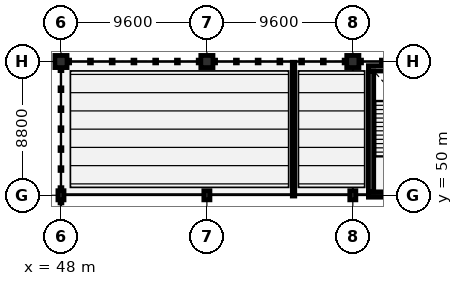
"""IFC4 building model, lengths in metres.
Left out: names, types, materials, properties, quantities, classifications, styles, units other than length and angle.
Written with IfcOpenShell. Run it as: python <this file> out.ifc"""

import sys

from ifc_helpers import new_model, si_unit, direction, frame, frame_2d, origin, origin_2d, place, context, subcontext, project, spatial, rectangle, extrude, element, fill, save


model = new_model("IFC4")
c1 = context("Model", 3, precision=1e-05, world=origin(), true_north=direction((0.0, 1.0)))
c2 = subcontext(c1, "Body", "Model", "MODEL_VIEW")
j1 = project(units=[si_unit("LENGTHUNIT", "METRE"), si_unit("PLANEANGLEUNIT", "RADIAN")], contexts=[c1])
p1 = place(None, origin())
s1 = spatial("IfcSite", under=j1, at=p1, CompositionType="ELEMENT")
p2 = place(p1, origin())
s2 = spatial("IfcBuilding", under=s1, at=p2, CompositionType="ELEMENT")
p3 = place(p2, frame((0.0, 0.0, 4.8)))
s3 = spatial("IfcBuildingStorey", under=s2, at=p3, CompositionType="ELEMENT", Elevation=4.8)
p4 = place(p3, frame((48.0, 50.0, 0.0), z_axis=(0.0, 0.0, 1.0), x_axis=(1.0, 0.0, 0.0)))
e1 = element("IfcColumn", 1, at=p4, inside=s3, PredefinedType="COLUMN", context=c2, shape_type="SweptSolid", body=[
    extrude(rectangle(XDim=0.4, YDim=0.6, at=origin_2d()), origin(), (0.0, 0.0, 1.0), 4.8),
])
p5 = place(p3, frame((48.0, 58.8, 0.0), z_axis=(0.0, 0.0, 1.0), x_axis=(1.0, 0.0, 0.0)))
e2 = element("IfcColumn", 2, at=p5, inside=s3, PredefinedType="COLUMN", context=c2, shape_type="SweptSolid", body=[
    extrude(rectangle(XDim=0.8, YDim=0.8, at=origin_2d()), origin(), (0.0, 0.0, 1.0), 4.8),
])
p6 = place(p3, frame((57.6, 50.0, 0.0), z_axis=(0.0, 0.0, 1.0), x_axis=(1.0, 0.0, 0.0)))
e3 = element("IfcColumn", 3, at=p6, inside=s3, PredefinedType="COLUMN", context=c2, shape_type="SweptSolid", body=[
    extrude(rectangle(XDim=0.4, YDim=0.6, at=origin_2d()), origin(), (0.0, 0.0, 1.0), 4.8),
])
p7 = place(p3, frame((57.6, 58.8, 0.0), z_axis=(0.0, 0.0, 1.0), x_axis=(1.0, 0.0, 0.0)))
e4 = element("IfcColumn", 4, at=p7, inside=s3, PredefinedType="COLUMN", context=c2, shape_type="SweptSolid", body=[
    extrude(rectangle(XDim=0.8, YDim=0.8, at=origin_2d()), origin(), (0.0, 0.0, 1.0), 4.8),
])
p8 = place(p3, frame((67.2, 50.0, 0.0), z_axis=(0.0, 0.0, 1.0), x_axis=(1.0, 0.0, 0.0)))
e5 = element("IfcColumn", 5, at=p8, inside=s3, PredefinedType="COLUMN", context=c2, shape_type="SweptSolid", body=[
    extrude(rectangle(XDim=0.4, YDim=0.6, at=origin_2d()), origin(), (0.0, 0.0, 1.0), 4.8),
])
p9 = place(p3, frame((67.2, 58.8, 0.0), z_axis=(0.0, 0.0, 1.0), x_axis=(1.0, 0.0, 0.0)))
e6 = element("IfcColumn", 6, at=p9, inside=s3, PredefinedType="COLUMN", context=c2, shape_type="SweptSolid", body=[
    extrude(rectangle(XDim=0.8, YDim=0.8, at=origin_2d()), origin(), (0.0, 0.0, 1.0), 4.8),
])
for number, where, z_axis, x_axis in (
    (7, (73.875, 50.05, 0.0), (0.0, 0.0, 1.0), (-1.0, 0.0, 0.0)),
    (8, (68.225, 58.35, 0.0), (0.0, 0.0, 1.0), (1.0, 0.0, 0.0)),
):
    element("IfcWall", number, at=place(p3, frame(where, z_axis=z_axis, x_axis=x_axis)), inside=s3, PredefinedType="SHEAR", context=c2, shape_type="SweptSolid", body=[
        extrude(rectangle(XDim=5.65, YDim=0.35, at=frame_2d((2.825, 0.0))), origin(), (0.0, 0.0, 1.0), 4.55),
    ])
p10 = place(p3, frame((68.4, 50.225, 0.0), z_axis=(0.0, 0.0, 1.0), x_axis=(0.0, 1.0, 0.0)))
e9 = element("IfcWall", 9, at=p10, inside=s3, PredefinedType="SHEAR", context=c2, shape_type="SweptSolid", body=[
    extrude(rectangle(XDim=7.95, YDim=0.35, at=frame_2d((3.975, 0.0))), origin(), (0.0, 0.0, 1.0), 4.55),
])
p11 = place(p10, frame((0.22, 0.0, 0.0)))
e10 = element("IfcOpeningElement", 10, at=p11, cuts=e9, PredefinedType="OPENING", context=c2, shape_type="SweptSolid", body=[
    extrude(rectangle(XDim=2.05, YDim=2.15, at=frame_2d((1.025, 1.075))), frame((0.0, 0.185, 0.0), z_axis=(0.0, -1.0, 0.0), x_axis=(1.0, 0.0, 0.0)), (0.0, 0.0, 1.0), 0.37),
])
p12 = place(p3, frame((63.3, 49.95, 0.0), z_axis=(0.0, 0.0, 1.0), x_axis=(0.0, 1.0, 0.0)))
e11 = element("IfcWall", 11, at=p12, inside=s3, PredefinedType="PARTITIONING", context=c2, shape_type="SweptSolid", body=[
    extrude(rectangle(XDim=8.8, YDim=0.16, at=frame_2d((4.4, 0.0))), origin(), (0.0, 0.0, 1.0), 4.42),
])
p13 = place(p12, frame((3.5, 0.0, 0.0)))
e12 = element("IfcOpeningElement", 12, at=p13, cuts=e11, PredefinedType="OPENING", context=c2, shape_type="SweptSolid", body=[
    extrude(rectangle(XDim=1.8, YDim=2.15, at=frame_2d((0.9, 1.075))), frame((0.0, 0.09, 0.0), z_axis=(0.0, -1.0, 0.0), x_axis=(1.0, 0.0, 0.0)), (0.0, 0.0, 1.0), 0.18),
])
p14 = place(p11, origin())
e13 = element("IfcDoor", 13, at=p14, inside=s3, OperationType="DOUBLE_DOOR_SINGLE_SWING", PredefinedType="DOOR", context=c2, shape_type="SweptSolid", body=[
    extrude(rectangle(XDim=2.05, YDim=2.15, at=frame_2d((1.025, 1.075))), frame((0.0, 0.025, 0.0), z_axis=(0.0, -1.0, 0.0), x_axis=(1.0, 0.0, 0.0)), (0.0, 0.0, 1.0), 0.05),
])
fill(e10, e13)
p15 = place(p13, origin())
e14 = element("IfcDoor", 14, at=p15, inside=s3, OperationType="DOUBLE_DOOR_SINGLE_SWING", PredefinedType="DOOR", context=c2, shape_type="SweptSolid", body=[
    extrude(rectangle(XDim=1.8, YDim=2.15, at=frame_2d((0.9, 1.075))), frame((0.0, 0.025, 0.0), z_axis=(0.0, -1.0, 0.0), x_axis=(1.0, 0.0, 0.0)), (0.0, 0.0, 1.0), 0.05),
])
fill(e12, e14)
save(model, sys.argv[1])
